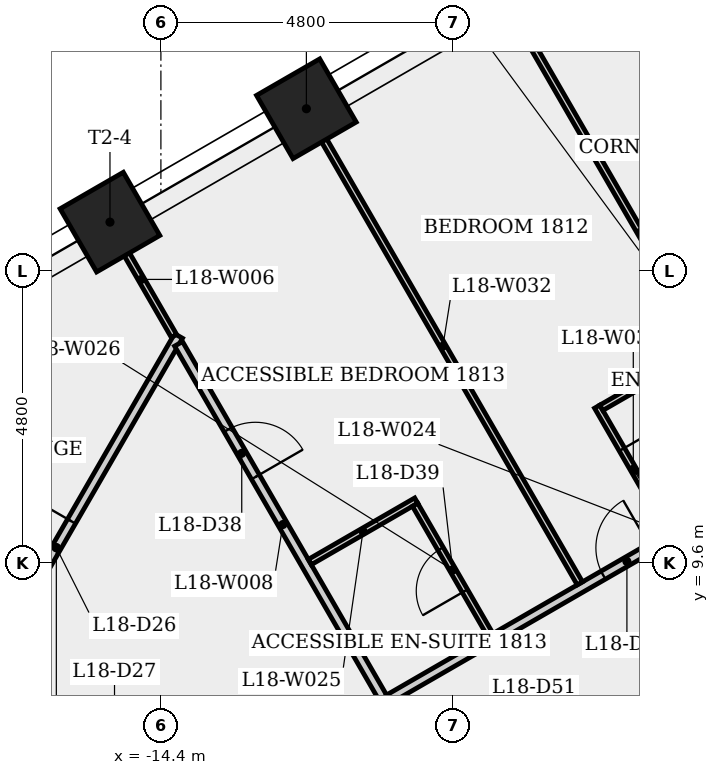
"""IFC4 building model, lengths in metres.
Left out: names, types, materials, properties, quantities, classifications, styles, units other than length and angle.
Written with IfcOpenShell. Run it as: python <this file> out.ifc"""

import sys

from ifc_helpers import new_model, si_unit, direction, frame, frame_2d, origin, origin_2d, place, context, subcontext, project, spatial, rectangle, extrude, element, fill, save


model = new_model("IFC4")
c1 = context("Model", 3, precision=1e-05, world=origin(), true_north=direction((0.0, 1.0)))
c2 = subcontext(c1, "Body", "Model", "MODEL_VIEW")
j1 = project(units=[si_unit("LENGTHUNIT", "METRE"), si_unit("PLANEANGLEUNIT", "RADIAN")], contexts=[c1])
p1 = place(None, origin())
s1 = spatial("IfcSite", under=j1, at=p1, CompositionType="ELEMENT")
p2 = place(p1, origin())
s2 = spatial("IfcBuilding", under=s1, at=p2, CompositionType="ELEMENT")
p3 = place(p2, frame((0.0, 0.0, 70.3)))
s3 = spatial("IfcBuildingStorey", under=s2, at=p3, CompositionType="ELEMENT", Elevation=70.3)
p4 = place(p3, frame((0.2, 10.623, 0.0), z_axis=(0.0, 0.0, 1.0), x_axis=(-0.866023993627, -0.500002442456, 0.0)))
e1 = element("IfcWall", 1, at=p4, inside=s3, PredefinedType="SHEAR", context=c2, shape_type="SweptSolid", body=[
    extrude(rectangle(XDim=10.97, YDim=0.8, at=frame_2d((5.485, 0.0))), origin(), (0.0, 0.0, 1.0), 4.0),
])
p5 = place(p4, frame((9.325, 0.0, 0.0)))
e2 = element("IfcOpeningElement", 2, at=p5, cuts=e1, PredefinedType="OPENING", context=c2, shape_type="SweptSolid", body=[
    extrude(rectangle(XDim=0.9, YDim=2.1, at=frame_2d((0.45, 1.05))), frame((0.0, 0.41, 0.0), z_axis=(0.0, -1.0, 0.0), x_axis=(1.0, 0.0, 0.0)), (0.0, 0.0, 1.0), 0.82),
])
p6 = place(p4, frame((2.091, 0.0, 0.0)))
e3 = element("IfcOpeningElement", 3, at=p6, cuts=e1, PredefinedType="OPENING", context=c2, shape_type="SweptSolid", body=[
    extrude(rectangle(XDim=0.9, YDim=2.1, at=frame_2d((0.45, 1.05))), frame((0.0, 0.41, 0.0), z_axis=(0.0, -1.0, 0.0), x_axis=(1.0, 0.0, 0.0)), (0.0, 0.0, 1.0), 0.82),
])
for number, where, z_axis, x_axis in (
    (4, (-12.007, 17.068, 0.0), (0.0, 0.0, 1.0), (-0.5, 0.866, 0.0)),
    (5, (-15.238, 15.203, 0.0), (0.0, 0.0, 1.0), (-0.5, 0.866, 0.0)),
):
    element("IfcColumn", number, at=place(p3, frame(where, z_axis=z_axis, x_axis=x_axis)), inside=s3, PredefinedType="COLUMN", context=c2, shape_type="SweptSolid", body=[
        extrude(rectangle(XDim=1.2, YDim=1.2, at=origin_2d()), origin(), (0.0, 0.0, 1.0), 4.0),
    ])
p7 = place(p3, frame((-18.13, 6.367, 0.0), z_axis=(0.0, 0.0, 1.0), x_axis=(0.499982653806, 0.866035418383, 0.0)))
e6 = element("IfcWall", 6, at=p7, inside=s3, PredefinedType="PARTITIONING", context=c2, shape_type="SweptSolid", body=[
    extrude(rectangle(XDim=8.041, YDim=0.15, at=frame_2d((4.021, 0.0))), origin(), (0.0, 0.0, 1.0), 3.6),
])
p8 = place(p7, frame((3.521, 0.0, 0.0)))
e7 = element("IfcOpeningElement", 7, at=p8, cuts=e6, PredefinedType="OPENING", context=c2, shape_type="SweptSolid", body=[
    extrude(rectangle(XDim=1.0, YDim=2.1, at=frame_2d((0.5, 1.05))), frame((0.0, 0.085, 0.0), z_axis=(0.0, -1.0, 0.0), x_axis=(1.0, 0.0, 0.0)), (0.0, 0.0, 1.0), 0.17),
])
p9 = place(p3, frame((-15.259, 15.19, 0.0), z_axis=(0.0, 0.0, 1.0), x_axis=(0.500014347272, -0.866017120224, 0.0)))
e8 = element("IfcWall", 8, at=p9, inside=s3, PredefinedType="PARTITIONING", context=c2, shape_type="SweptSolid", body=[
    extrude(rectangle(XDim=2.148, YDim=0.1, at=frame_2d((1.074, 0.0))), origin(), (0.0, 0.0, 1.0), 3.6),
])
p10 = place(p3, frame((-14.11, 13.2, 0.0), z_axis=(0.0, 0.0, 1.0), x_axis=(0.500007857356, -0.866020867291, 0.0)))
e9 = element("IfcWall", 9, at=p10, inside=s3, PredefinedType="PARTITIONING", context=c2, shape_type="SweptSolid", body=[
    extrude(rectangle(XDim=6.862, YDim=0.15, at=frame_2d((3.431, 0.0))), origin(), (0.0, 0.0, 1.0), 3.6),
])
p11 = place(p10, frame((1.628, 0.0, 0.0)))
e10 = element("IfcOpeningElement", 10, at=p11, cuts=e9, PredefinedType="OPENING", context=c2, shape_type="SweptSolid", body=[
    extrude(rectangle(XDim=0.9, YDim=2.1, at=frame_2d((0.45, 1.05))), frame((0.0, 0.085, 0.0), z_axis=(0.0, -1.0, 0.0), x_axis=(1.0, 0.0, 0.0)), (0.0, 0.0, 1.0), 0.17),
])
p12 = place(p3, frame((-10.651, 7.361, 0.0), z_axis=(0.0, 0.0, 1.0), x_axis=(0.866029938532, 0.499992145504, 0.0)))
e11 = element("IfcWall", 11, at=p12, inside=s3, PredefinedType="PARTITIONING", context=c2, shape_type="SweptSolid", body=[
    extrude(rectangle(XDim=10.788, YDim=0.15, at=frame_2d((5.394, 0.0))), origin(), (0.0, 0.0, 1.0), 3.6),
])
p13 = place(p12, frame((4.071, 0.0, 0.0)))
e12 = element("IfcOpeningElement", 12, at=p13, cuts=e11, PredefinedType="OPENING", context=c2, shape_type="SweptSolid", body=[
    extrude(rectangle(XDim=0.9, YDim=2.1, at=frame_2d((0.45, 1.05))), frame((0.0, 0.085, 0.0), z_axis=(0.0, -1.0, 0.0), x_axis=(1.0, 0.0, 0.0)), (0.0, 0.0, 1.0), 0.17),
])
p14 = place(p3, frame((-10.201, 10.623, 0.0), z_axis=(0.0, 0.0, 1.0), x_axis=(-0.866026663364, -0.499997818338, 0.0)))
e13 = element("IfcWall", 13, at=p14, inside=s3, PredefinedType="PARTITIONING", context=c2, shape_type="SweptSolid", body=[
    extrude(rectangle(XDim=2.021, YDim=0.1, at=frame_2d((1.01, 0.0))), origin(), (0.0, 0.0, 1.0), 3.6),
])
p15 = place(p3, frame((-8.982, 8.411, 0.0), z_axis=(0.0, 0.0, 1.0), x_axis=(-0.4999899861, 0.866031185235, 0.0)))
e14 = element("IfcWall", 14, at=p15, inside=s3, PredefinedType="PARTITIONING", context=c2, shape_type="SweptSolid", body=[
    extrude(rectangle(XDim=2.475, YDim=0.1, at=frame_2d((1.238, 0.0))), origin(), (0.0, 0.0, 1.0), 3.6),
])
p16 = place(p15, frame((0.837, 0.0, 0.0)))
e15 = element("IfcOpeningElement", 15, at=p16, cuts=e14, PredefinedType="OPENING", context=c2, shape_type="SweptSolid", body=[
    extrude(rectangle(XDim=0.8, YDim=2.1, at=frame_2d((0.4, 1.05))), frame((0.0, 0.06, 0.0), z_axis=(0.0, -1.0, 0.0), x_axis=(1.0, 0.0, 0.0)), (0.0, 0.0, 1.0), 0.12),
])
p17 = place(p3, frame((-7.51, 9.261, 0.0), z_axis=(0.0, 0.0, 1.0), x_axis=(-0.500009404554, 0.866019973994, 0.0)))
e16 = element("IfcWall", 16, at=p17, inside=s3, PredefinedType="PARTITIONING", context=c2, shape_type="SweptSolid", body=[
    extrude(rectangle(XDim=9.01, YDim=0.1, at=frame_2d((4.505, 0.0))), origin(), (0.0, 0.0, 1.0), 3.6),
])
p18 = place(p3, frame((-7.225, 12.168, 0.0), z_axis=(0.0, 0.0, 1.0), x_axis=(0.500030943131, -0.866007538022, 0.0)))
e17 = element("IfcWall", 17, at=p18, inside=s3, PredefinedType="PARTITIONING", context=c2, shape_type="SweptSolid", body=[
    extrude(rectangle(XDim=2.375, YDim=0.1, at=frame_2d((1.188, 0.0))), origin(), (0.0, 0.0, 1.0), 3.6),
])
p19 = place(p18, frame((0.812, 0.0, 0.0)))
e18 = element("IfcOpeningElement", 18, at=p19, cuts=e17, PredefinedType="OPENING", context=c2, shape_type="SweptSolid", body=[
    extrude(rectangle(XDim=0.8, YDim=2.1, at=frame_2d((0.4, 1.05))), frame((0.0, 0.06, 0.0), z_axis=(0.0, -1.0, 0.0), x_axis=(1.0, 0.0, 0.0)), (0.0, 0.0, 1.0), 0.12),
])
p20 = place(p3, frame((-7.156, 12.149, 0.0), z_axis=(0.0, 0.0, 1.0), x_axis=(0.866005746929, 0.500034045127, 0.0)))
e19 = element("IfcWall", 19, at=p20, inside=s3, PredefinedType="PARTITIONING", context=c2, shape_type="SweptSolid", body=[
    extrude(rectangle(XDim=4.092, YDim=0.1, at=frame_2d((2.046, 0.0))), origin(), (0.0, 0.0, 1.0), 3.6),
])
p21 = place(p3, frame((-8.77, 18.937, 0.0), z_axis=(0.0, 0.0, 1.0), x_axis=(0.499997670926, -0.866026748472, 0.0)))
e20 = element("IfcWall", 20, at=p21, inside=s3, PredefinedType="PARTITIONING", context=c2, shape_type="SweptSolid", body=[
    extrude(rectangle(XDim=9.01, YDim=0.1, at=frame_2d((4.505, 0.0))), origin(), (0.0, 0.0, 1.0), 3.6),
])
p22 = place(p8, origin())
e21 = element("IfcDoor", 21, at=p22, inside=s3, OperationType="SINGLE_SWING_RIGHT", PredefinedType="DOOR", context=c2, shape_type="SweptSolid", body=[
    extrude(rectangle(XDim=1.0, YDim=2.1, at=frame_2d((0.5, 1.05))), frame((0.0, 0.025, 0.0), z_axis=(0.0, -1.0, 0.0), x_axis=(1.0, 0.0, 0.0)), (0.0, 0.0, 1.0), 0.05),
])
fill(e7, e21)
p23 = place(p13, origin())
e22 = element("IfcDoor", 22, at=p23, inside=s3, OperationType="SINGLE_SWING_RIGHT", PredefinedType="DOOR", context=c2, shape_type="SweptSolid", body=[
    extrude(rectangle(XDim=0.9, YDim=2.1, at=frame_2d((0.45, 1.05))), frame((0.0, 0.025, 0.0), z_axis=(0.0, -1.0, 0.0), x_axis=(1.0, 0.0, 0.0)), (0.0, 0.0, 1.0), 0.05),
])
fill(e12, e22)
p24 = place(p19, origin())
e23 = element("IfcDoor", 23, at=p24, inside=s3, OperationType="SINGLE_SWING_LEFT", PredefinedType="DOOR", context=c2, shape_type="SweptSolid", body=[
    extrude(rectangle(XDim=0.8, YDim=2.1, at=frame_2d((0.4, 1.05))), frame((0.0, 0.025, 0.0), z_axis=(0.0, -1.0, 0.0), x_axis=(1.0, 0.0, 0.0)), (0.0, 0.0, 1.0), 0.05),
])
fill(e18, e23)
p25 = place(p11, origin())
e24 = element("IfcDoor", 24, at=p25, inside=s3, OperationType="SINGLE_SWING_RIGHT", PredefinedType="DOOR", context=c2, shape_type="SweptSolid", body=[
    extrude(rectangle(XDim=0.9, YDim=2.1, at=frame_2d((0.45, 1.05))), frame((0.0, 0.025, 0.0), z_axis=(0.0, -1.0, 0.0), x_axis=(1.0, 0.0, 0.0)), (0.0, 0.0, 1.0), 0.05),
])
fill(e10, e24)
p26 = place(p16, origin())
e25 = element("IfcDoor", 25, at=p26, inside=s3, OperationType="SINGLE_SWING_LEFT", PredefinedType="DOOR", context=c2, shape_type="SweptSolid", body=[
    extrude(rectangle(XDim=0.8, YDim=2.1, at=frame_2d((0.4, 1.05))), frame((0.0, 0.025, 0.0), z_axis=(0.0, -1.0, 0.0), x_axis=(1.0, 0.0, 0.0)), (0.0, 0.0, 1.0), 0.05),
])
fill(e15, e25)
save(model, sys.argv[1])
